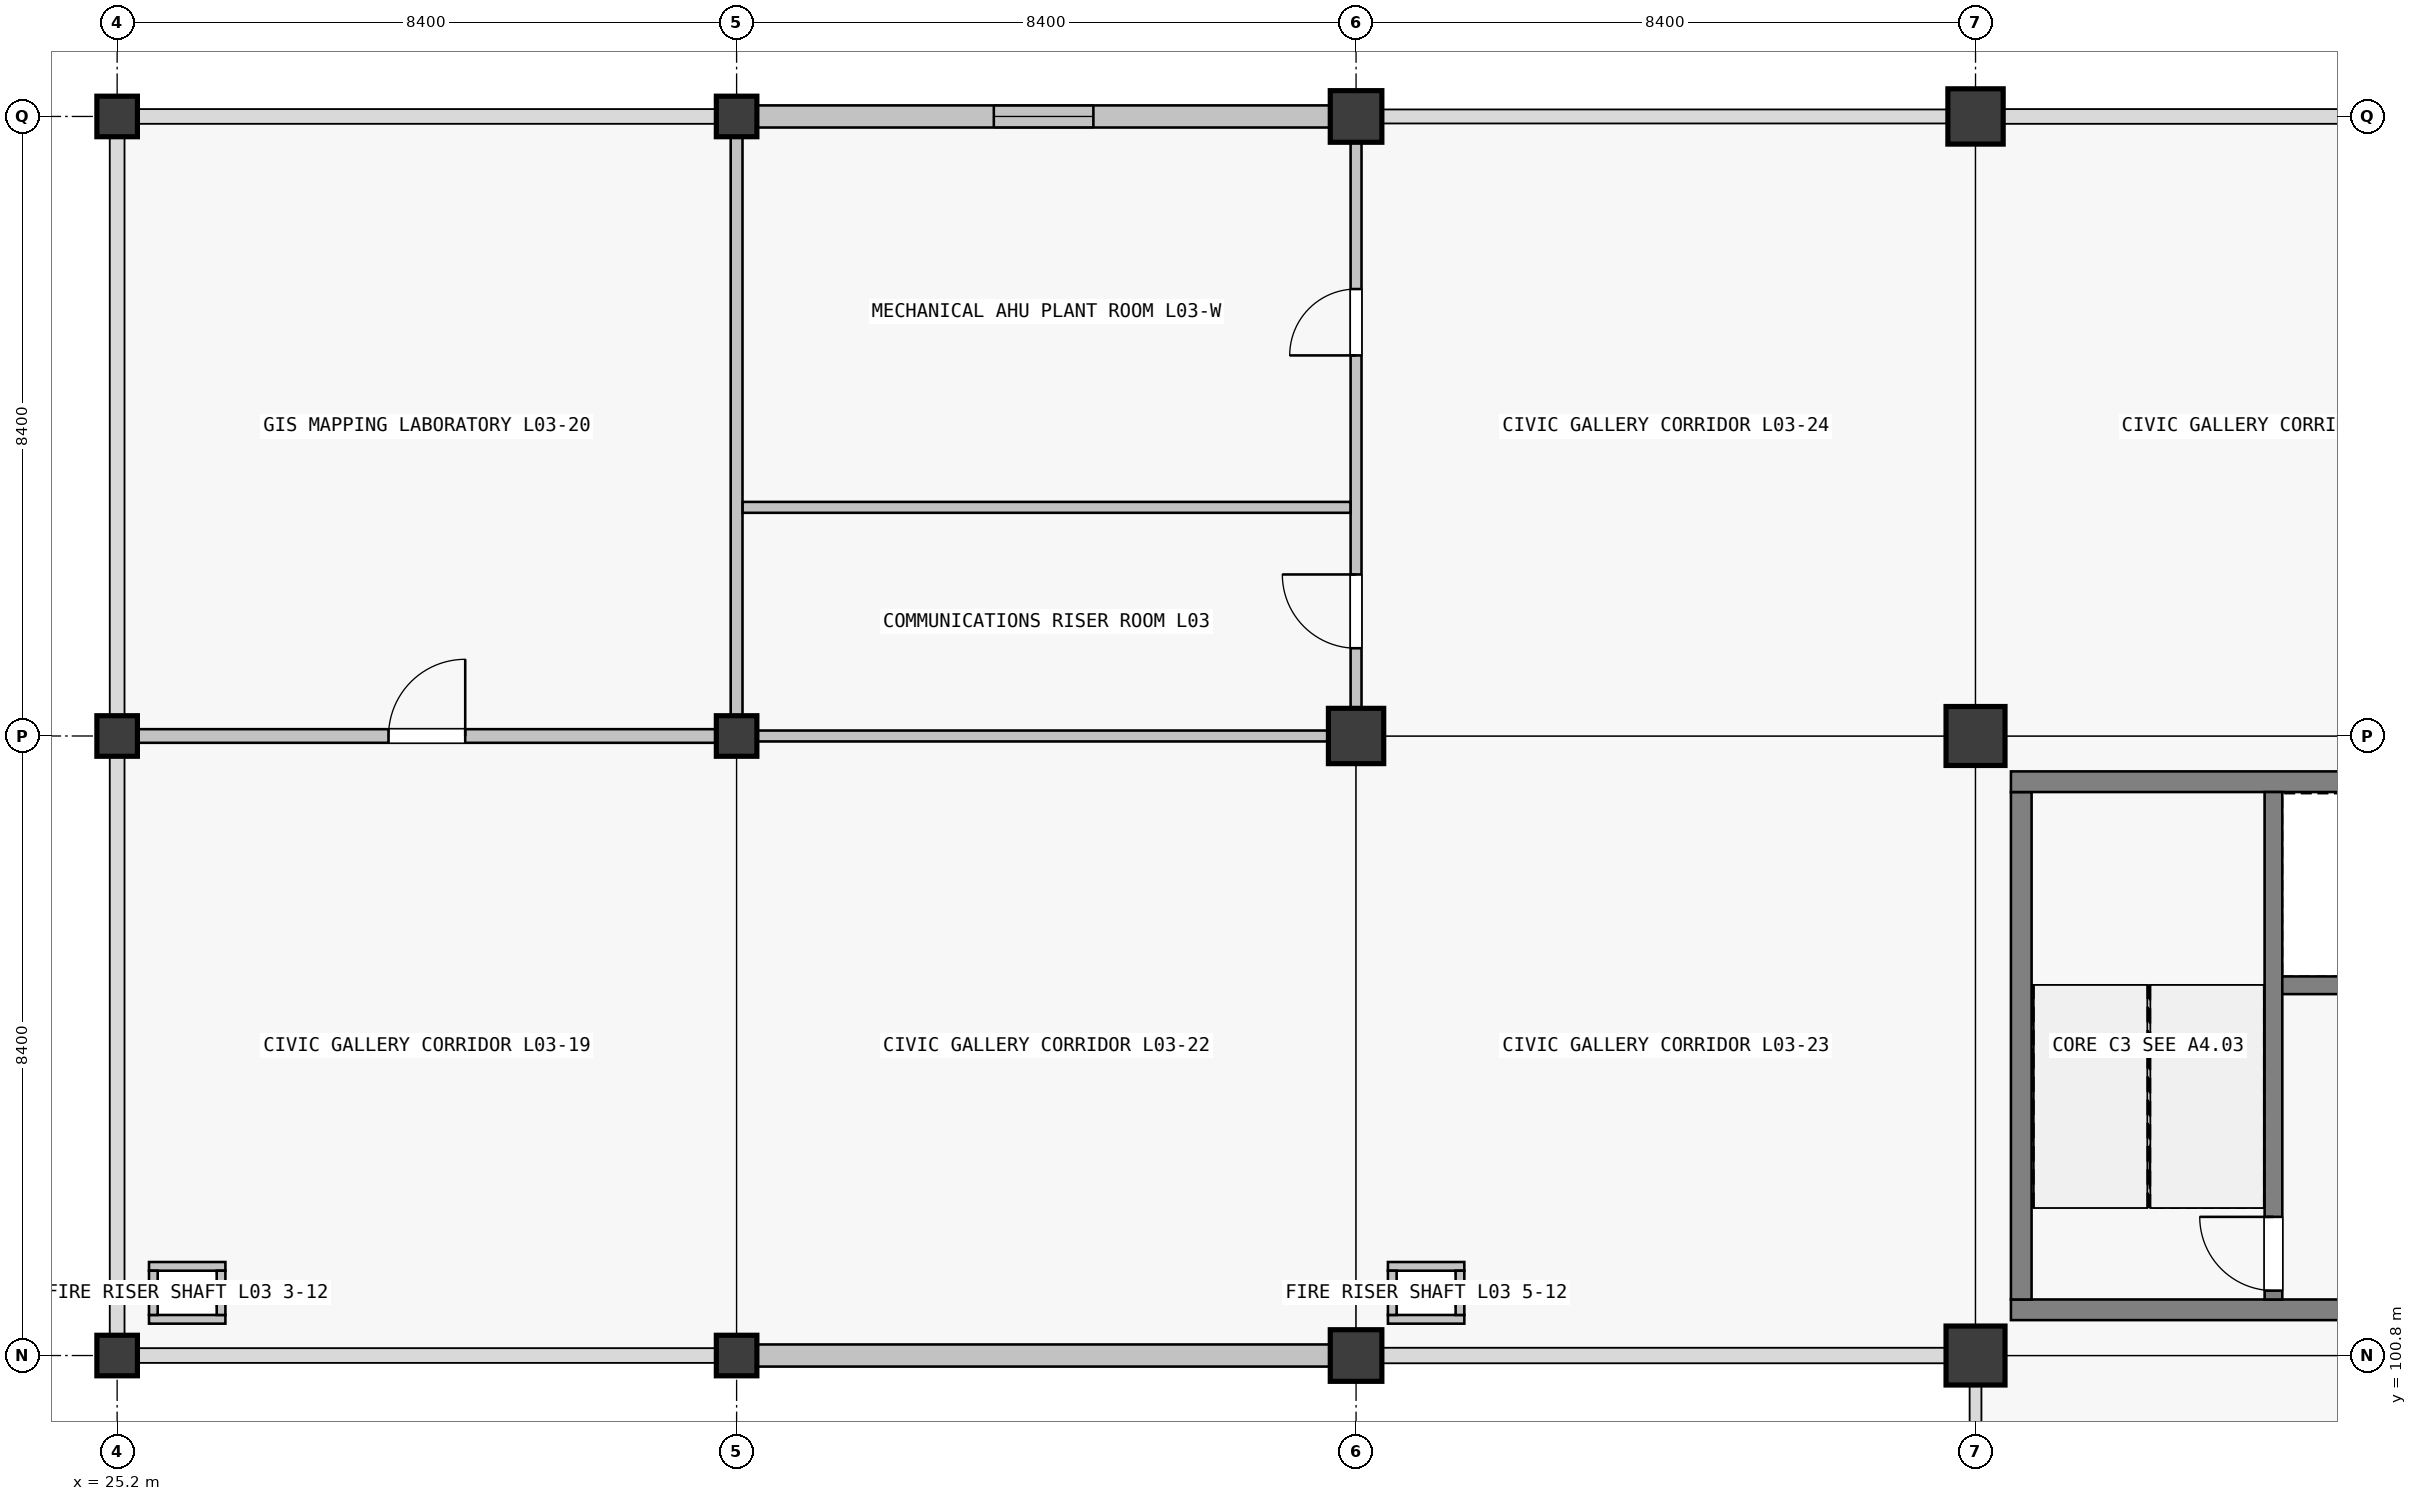
"""IFC4 building model, lengths in metres.
Left out: names, types, materials, properties, quantities, classifications, styles, units other than length and angle.
Written with IfcOpenShell. Run it as: python <this file> out.ifc"""

import sys

from ifc_helpers import new_model, si_unit, direction, frame, frame_2d, origin, origin_2d, place, context, subcontext, project, spatial, rectangle, extrude, element, fill, save


model = new_model("IFC4")
c1 = context("Model", 3, precision=1e-05, world=origin(), true_north=direction((0.0, 1.0)))
c2 = subcontext(c1, "Body", "Model", "MODEL_VIEW")
j1 = project(units=[si_unit("LENGTHUNIT", "METRE"), si_unit("PLANEANGLEUNIT", "RADIAN")], contexts=[c1])
p1 = place(None, origin())
s1 = spatial("IfcSite", under=j1, at=p1, CompositionType="ELEMENT")
p2 = place(p1, origin())
s2 = spatial("IfcBuilding", under=s1, at=p2, CompositionType="ELEMENT")
p3 = place(p2, frame((0.0, 0.0, 14.76)))
s3 = spatial("IfcBuildingStorey", under=s2, at=p3, CompositionType="ELEMENT", Elevation=14.76)
for number, where, z_axis, x_axis in (
    (1, (25.2, 100.8, 0.0), (0.0, 0.0, 1.0), (1.0, 0.0, 0.0)),
    (2, (25.2, 109.2, 0.0), (0.0, 0.0, 1.0), (1.0, 0.0, 0.0)),
    (3, (25.2, 117.6, 0.0), (0.0, 0.0, 1.0), (1.0, 0.0, 0.0)),
    (4, (33.6, 100.8, 0.0), (0.0, 0.0, 1.0), (1.0, 0.0, 0.0)),
    (5, (33.6, 109.2, 0.0), (0.0, 0.0, 1.0), (1.0, 0.0, 0.0)),
    (6, (33.6, 117.6, 0.0), (0.0, 0.0, 1.0), (1.0, 0.0, 0.0)),
):
    element("IfcColumn", number, at=place(p3, frame(where, z_axis=z_axis, x_axis=x_axis)), inside=s3, PredefinedType="COLUMN", context=c2, shape_type="SweptSolid", body=[
        extrude(rectangle(XDim=0.55, YDim=0.55, at=origin_2d()), origin(), (0.0, 0.0, 1.0), 4.07),
    ])
p4 = place(p3, frame((42.0, 100.8, 0.0), z_axis=(0.0, 0.0, 1.0), x_axis=(1.0, 0.0, 0.0)))
e7 = element("IfcColumn", 7, at=p4, inside=s3, PredefinedType="COLUMN", context=c2, shape_type="SweptSolid", body=[
    extrude(rectangle(XDim=0.7, YDim=0.7, at=origin_2d()), origin(), (0.0, 0.0, 1.0), 4.32),
])
p5 = place(p3, frame((42.0, 109.2, 0.0), z_axis=(0.0, 0.0, 1.0), x_axis=(1.0, 0.0, 0.0)))
e8 = element("IfcColumn", 8, at=p5, inside=s3, PredefinedType="COLUMN", context=c2, shape_type="SweptSolid", body=[
    extrude(rectangle(XDim=0.75, YDim=0.75, at=origin_2d()), origin(), (0.0, 0.0, 1.0), 4.32),
])
p6 = place(p3, frame((42.0, 117.6, 0.0), z_axis=(0.0, 0.0, 1.0), x_axis=(1.0, 0.0, 0.0)))
e9 = element("IfcColumn", 9, at=p6, inside=s3, PredefinedType="COLUMN", context=c2, shape_type="SweptSolid", body=[
    extrude(rectangle(XDim=0.7, YDim=0.7, at=origin_2d()), origin(), (0.0, 0.0, 1.0), 4.32),
])
for number, where, z_axis, x_axis in (
    (10, (50.4, 100.8, 0.0), (0.0, 0.0, 1.0), (1.0, 0.0, 0.0)),
    (11, (50.4, 109.2, 0.0), (0.0, 0.0, 1.0), (1.0, 0.0, 0.0)),
):
    element("IfcColumn", number, at=place(p3, frame(where, z_axis=z_axis, x_axis=x_axis)), inside=s3, PredefinedType="COLUMN", context=c2, shape_type="SweptSolid", body=[
        extrude(rectangle(XDim=0.8, YDim=0.8, at=origin_2d()), origin(), (0.0, 0.0, 1.0), 4.32),
    ])
p7 = place(p3, frame((50.4, 117.6, 0.0), z_axis=(0.0, 0.0, 1.0), x_axis=(1.0, 0.0, 0.0)))
e12 = element("IfcColumn", 12, at=p7, inside=s3, PredefinedType="COLUMN", context=c2, shape_type="SweptSolid", body=[
    extrude(rectangle(XDim=0.75, YDim=0.75, at=origin_2d()), origin(), (0.0, 0.0, 1.0), 4.32),
])
p8 = place(p3, frame((41.649, 100.8, 0.0), z_axis=(0.0, 0.0, 1.0), x_axis=(-1.0, 0.0, 0.0)))
e13 = element("IfcWall", 13, at=p8, inside=s3, PredefinedType="SOLIDWALL", context=c2, shape_type="SweptSolid", body=[
    extrude(rectangle(XDim=7.773, YDim=0.3, at=frame_2d((3.886, 0.0))), origin(), (0.0, 0.0, 1.0), 3.37),
])
p9 = place(p3, frame((33.876, 117.6, 0.0), z_axis=(0.0, 0.0, 1.0), x_axis=(1.0, 0.0, 0.0)))
e14 = element("IfcWall", 14, at=p9, inside=s3, PredefinedType="SOLIDWALL", context=c2, shape_type="SweptSolid", body=[
    extrude(rectangle(XDim=7.773, YDim=0.3, at=frame_2d((3.886, 0.0))), origin(), (0.0, 0.0, 1.0), 3.37),
])
p10 = place(p9, frame((3.212, 0.0, 0.9)))
e15 = element("IfcOpeningElement", 15, at=p10, cuts=e14, PredefinedType="OPENING", context=c2, shape_type="SweptSolid", body=[
    extrude(rectangle(XDim=1.35, YDim=1.5, at=frame_2d((0.675, 0.75))), frame((0.0, 0.15, 0.0), z_axis=(0.0, -1.0, 0.0), x_axis=(1.0, 0.0, 0.0)), (0.0, 0.0, 1.0), 0.3),
])
p11 = place(p3, frame((58.32, 101.42, 0.0), z_axis=(0.0, 0.0, 1.0), x_axis=(-1.0, 0.0, 0.0)))
e16 = element("IfcWall", 16, at=p11, inside=s3, PredefinedType="SHEAR", context=c2, shape_type="SweptSolid", body=[
    extrude(rectangle(XDim=7.44, YDim=0.28, at=frame_2d((3.72, 0.0))), origin(), (0.0, 0.0, 1.0), 4.32),
])
p12 = place(p11, frame((1.28, 0.0, 0.0)))
e17 = element("IfcOpeningElement", 17, at=p12, cuts=e16, PredefinedType="OPENING", context=c2, shape_type="SweptSolid", body=[
    extrude(rectangle(XDim=1.5, YDim=2.15, at=frame_2d((0.75, 1.075))), frame((0.0, 0.14, 0.0), z_axis=(0.0, -1.0, 0.0), x_axis=(1.0, 0.0, 0.0)), (0.0, 0.0, 1.0), 0.28),
])
p13 = place(p3, frame((51.02, 101.56, 0.0), z_axis=(0.0, 0.0, 1.0), x_axis=(0.0, 1.0, 0.0)))
e18 = element("IfcWall", 18, at=p13, inside=s3, PredefinedType="SHEAR", context=c2, shape_type="SweptSolid", body=[
    extrude(rectangle(XDim=6.88, YDim=0.28, at=frame_2d((3.44, 0.0))), origin(), (0.0, 0.0, 1.0), 4.32),
])
p14 = place(p3, frame((50.88, 108.58, 0.0), z_axis=(0.0, 0.0, 1.0), x_axis=(1.0, 0.0, 0.0)))
e19 = element("IfcWall", 19, at=p14, inside=s3, PredefinedType="SHEAR", context=c2, shape_type="SweptSolid", body=[
    extrude(rectangle(XDim=7.44, YDim=0.28, at=frame_2d((3.72, 0.0))), origin(), (0.0, 0.0, 1.0), 4.32),
])
p15 = place(p3, frame((54.44, 101.56, 0.0), z_axis=(0.0, 0.0, 1.0), x_axis=(0.0, 1.0, 0.0)))
e20 = element("IfcWall", 20, at=p15, inside=s3, PredefinedType="SHEAR", context=c2, shape_type="SweptSolid", body=[
    extrude(rectangle(XDim=6.88, YDim=0.24, at=frame_2d((3.44, 0.0))), origin(), (0.0, 0.0, 1.0), 4.32),
])
p16 = place(p15, frame((0.12, 0.0, 0.0)))
e21 = element("IfcOpeningElement", 21, at=p16, cuts=e20, PredefinedType="OPENING", context=c2, shape_type="SweptSolid", body=[
    extrude(rectangle(XDim=1.0, YDim=2.15, at=frame_2d((0.5, 1.075))), frame((0.0, 0.12, 0.0), z_axis=(0.0, -1.0, 0.0), x_axis=(1.0, 0.0, 0.0)), (0.0, 0.0, 1.0), 0.24),
])
p17 = place(p3, frame((54.56, 105.82, 0.0), z_axis=(0.0, 0.0, 1.0), x_axis=(1.0, 0.0, 0.0)))
e22 = element("IfcWall", 22, at=p17, inside=s3, PredefinedType="SHEAR", context=c2, shape_type="SweptSolid", body=[
    extrude(rectangle(XDim=3.48, YDim=0.24, at=frame_2d((1.74, 0.0))), origin(), (0.0, 0.0, 1.0), 4.32),
])
p18 = place(p17, frame((1.14, 0.0, 0.0)))
e23 = element("IfcOpeningElement", 23, at=p18, cuts=e22, PredefinedType="OPENING", context=c2, shape_type="SweptSolid", body=[
    extrude(rectangle(XDim=1.2, YDim=2.2, at=frame_2d((0.6, 1.1))), frame((0.0, 0.12, 0.0), z_axis=(0.0, -1.0, 0.0), x_axis=(1.0, 0.0, 0.0)), (0.0, 0.0, 1.0), 0.24),
])
for number, where, z_axis, x_axis in (
    (24, (25.632, 101.291, 0.0), (0.0, 0.0, 1.0), (1.0, 0.0, 0.0)),
    (25, (25.632, 102.009, 0.0), (0.0, 0.0, 1.0), (1.0, 0.0, 0.0)),
):
    element("IfcWall", number, at=place(p3, frame(where, z_axis=z_axis, x_axis=x_axis)), inside=s3, PredefinedType="PARTITIONING", context=c2, shape_type="SweptSolid", body=[
        extrude(rectangle(XDim=1.036, YDim=0.118, at=frame_2d((0.518, 0.0))), origin(), (0.0, 0.0, 1.0), 3.35),
    ])
for number, where, z_axis, x_axis in (
    (26, (25.691, 101.35, 0.0), (0.0, 0.0, 1.0), (0.0, 1.0, 0.0)),
    (27, (26.609, 101.35, 0.0), (0.0, 0.0, 1.0), (0.0, 1.0, 0.0)),
):
    element("IfcWall", number, at=place(p3, frame(where, z_axis=z_axis, x_axis=x_axis)), inside=s3, PredefinedType="PARTITIONING", context=c2, shape_type="SweptSolid", body=[
        extrude(rectangle(XDim=0.6, YDim=0.118, at=frame_2d((0.3, 0.0))), origin(), (0.0, 0.0, 1.0), 3.35),
    ])
for number, where, z_axis, x_axis in (
    (28, (42.432, 101.291, 0.0), (0.0, 0.0, 1.0), (1.0, 0.0, 0.0)),
    (29, (42.432, 102.009, 0.0), (0.0, 0.0, 1.0), (1.0, 0.0, 0.0)),
):
    element("IfcWall", number, at=place(p3, frame(where, z_axis=z_axis, x_axis=x_axis)), inside=s3, PredefinedType="PARTITIONING", context=c2, shape_type="SweptSolid", body=[
        extrude(rectangle(XDim=1.036, YDim=0.118, at=frame_2d((0.518, 0.0))), origin(), (0.0, 0.0, 1.0), 3.35),
    ])
for number, where, z_axis, x_axis in (
    (30, (42.491, 101.35, 0.0), (0.0, 0.0, 1.0), (0.0, 1.0, 0.0)),
    (31, (43.409, 101.35, 0.0), (0.0, 0.0, 1.0), (0.0, 1.0, 0.0)),
):
    element("IfcWall", number, at=place(p3, frame(where, z_axis=z_axis, x_axis=x_axis)), inside=s3, PredefinedType="PARTITIONING", context=c2, shape_type="SweptSolid", body=[
        extrude(rectangle(XDim=0.6, YDim=0.118, at=frame_2d((0.3, 0.0))), origin(), (0.0, 0.0, 1.0), 3.35),
    ])
p19 = place(p3, frame((25.477, 109.2, 0.0), z_axis=(0.0, 0.0, 1.0), x_axis=(1.0, 0.0, 0.0)))
e32 = element("IfcWall", 32, at=p19, inside=s3, PredefinedType="PARTITIONING", context=c2, shape_type="SweptSolid", body=[
    extrude(rectangle(XDim=7.846, YDim=0.185, at=frame_2d((3.923, 0.0))), origin(), (0.0, 0.0, 1.0), 3.19),
])
p20 = place(p19, frame((3.403, 0.0, 0.0)))
e33 = element("IfcOpeningElement", 33, at=p20, cuts=e32, PredefinedType="OPENING", context=c2, shape_type="SweptSolid", body=[
    extrude(rectangle(XDim=1.04, YDim=2.2, at=frame_2d((0.52, 1.1))), frame((0.0, 0.093, 0.0), z_axis=(0.0, -1.0, 0.0), x_axis=(1.0, 0.0, 0.0)), (0.0, 0.0, 1.0), 0.185),
])
p21 = place(p3, frame((33.877, 109.2, 0.0), z_axis=(0.0, 0.0, 1.0), x_axis=(1.0, 0.0, 0.0)))
e34 = element("IfcWall", 34, at=p21, inside=s3, PredefinedType="PARTITIONING", context=c2, shape_type="SweptSolid", body=[
    extrude(rectangle(XDim=7.746, YDim=0.148, at=frame_2d((3.873, 0.0))), origin(), (0.0, 0.0, 1.0), 3.19),
])
p22 = place(p3, frame((33.6, 109.477, 0.0), z_axis=(0.0, 0.0, 1.0), x_axis=(0.0, 1.0, 0.0)))
e35 = element("IfcWall", 35, at=p22, inside=s3, PredefinedType="PARTITIONING", context=c2, shape_type="SweptSolid", body=[
    extrude(rectangle(XDim=7.846, YDim=0.16, at=frame_2d((3.923, 0.0))), origin(), (0.0, 0.0, 1.0), 3.19),
])
p23 = place(p3, frame((42.0, 109.577, 0.0), z_axis=(0.0, 0.0, 1.0), x_axis=(0.0, 1.0, 0.0)))
e36 = element("IfcWall", 36, at=p23, inside=s3, PredefinedType="PARTITIONING", context=c2, shape_type="SweptSolid", body=[
    extrude(rectangle(XDim=7.671, YDim=0.148, at=frame_2d((3.835, 0.0))), origin(), (0.0, 0.0, 1.0), 3.19),
])
p24 = place(p23, frame((0.813, 0.0, 0.0)))
e37 = element("IfcOpeningElement", 37, at=p24, cuts=e36, PredefinedType="OPENING", context=c2, shape_type="SweptSolid", body=[
    extrude(rectangle(XDim=1.0, YDim=2.15, at=frame_2d((0.5, 1.075))), frame((0.0, 0.074, 0.0), z_axis=(0.0, -1.0, 0.0), x_axis=(1.0, 0.0, 0.0)), (0.0, 0.0, 1.0), 0.148),
])
p25 = place(p23, frame((4.783, 0.0, 0.0)))
e38 = element("IfcOpeningElement", 38, at=p25, cuts=e36, PredefinedType="OPENING", context=c2, shape_type="SweptSolid", body=[
    extrude(rectangle(XDim=0.9, YDim=2.05, at=frame_2d((0.45, 1.025))), frame((0.0, 0.074, 0.0), z_axis=(0.0, -1.0, 0.0), x_axis=(1.0, 0.0, 0.0)), (0.0, 0.0, 1.0), 0.148),
])
p26 = place(p3, frame((33.682, 112.3, 0.0), z_axis=(0.0, 0.0, 1.0), x_axis=(1.0, 0.0, 0.0)))
e39 = element("IfcWall", 39, at=p26, inside=s3, PredefinedType="PARTITIONING", context=c2, shape_type="SweptSolid", body=[
    extrude(rectangle(XDim=8.242, YDim=0.148, at=frame_2d((4.121, 0.0))), origin(), (0.0, 0.0, 1.0), 3.19),
])
p27 = place(p10, origin())
e40 = element("IfcWindow", 40, at=p27, inside=s3, PartitioningType="SINGLE_PANEL", PredefinedType="WINDOW", context=c2, shape_type="SweptSolid", body=[
    extrude(rectangle(XDim=1.35, YDim=1.5, at=frame_2d((0.675, 0.75))), frame((0.0, 0.03, 0.0), z_axis=(0.0, -1.0, 0.0), x_axis=(1.0, 0.0, 0.0)), (0.0, 0.0, 1.0), 0.06),
])
fill(e15, e40)
p28 = place(p16, origin())
e41 = element("IfcDoor", 41, at=p28, inside=s3, OperationType="SINGLE_SWING_RIGHT", PredefinedType="DOOR", context=c2, shape_type="SweptSolid", body=[
    extrude(rectangle(XDim=1.0, YDim=2.15, at=frame_2d((0.5, 1.075))), frame((0.0, 0.025, 0.0), z_axis=(0.0, -1.0, 0.0), x_axis=(1.0, 0.0, 0.0)), (0.0, 0.0, 1.0), 0.05),
])
fill(e21, e41)
p29 = place(p24, origin())
e42 = element("IfcDoor", 42, at=p29, inside=s3, OperationType="SINGLE_SWING_RIGHT", PredefinedType="DOOR", context=c2, shape_type="SweptSolid", body=[
    extrude(rectangle(XDim=1.0, YDim=2.15, at=frame_2d((0.5, 1.075))), frame((0.0, 0.025, 0.0), z_axis=(0.0, -1.0, 0.0), x_axis=(1.0, 0.0, 0.0)), (0.0, 0.0, 1.0), 0.05),
])
fill(e37, e42)
p30 = place(p25, origin())
e43 = element("IfcDoor", 43, at=p30, inside=s3, OperationType="SINGLE_SWING_LEFT", PredefinedType="DOOR", context=c2, shape_type="SweptSolid", body=[
    extrude(rectangle(XDim=0.9, YDim=2.05, at=frame_2d((0.45, 1.025))), frame((0.0, 0.025, 0.0), z_axis=(0.0, -1.0, 0.0), x_axis=(1.0, 0.0, 0.0)), (0.0, 0.0, 1.0), 0.05),
])
fill(e38, e43)
p31 = place(p20, origin())
e44 = element("IfcDoor", 44, at=p31, inside=s3, OperationType="SINGLE_SWING_RIGHT", PredefinedType="DOOR", context=c2, shape_type="SweptSolid", body=[
    extrude(rectangle(XDim=1.04, YDim=2.2, at=frame_2d((0.52, 1.1))), frame((0.0, 0.025, 0.0), z_axis=(0.0, -1.0, 0.0), x_axis=(1.0, 0.0, 0.0)), (0.0, 0.0, 1.0), 0.05),
])
fill(e33, e44)
save(model, sys.argv[1])
